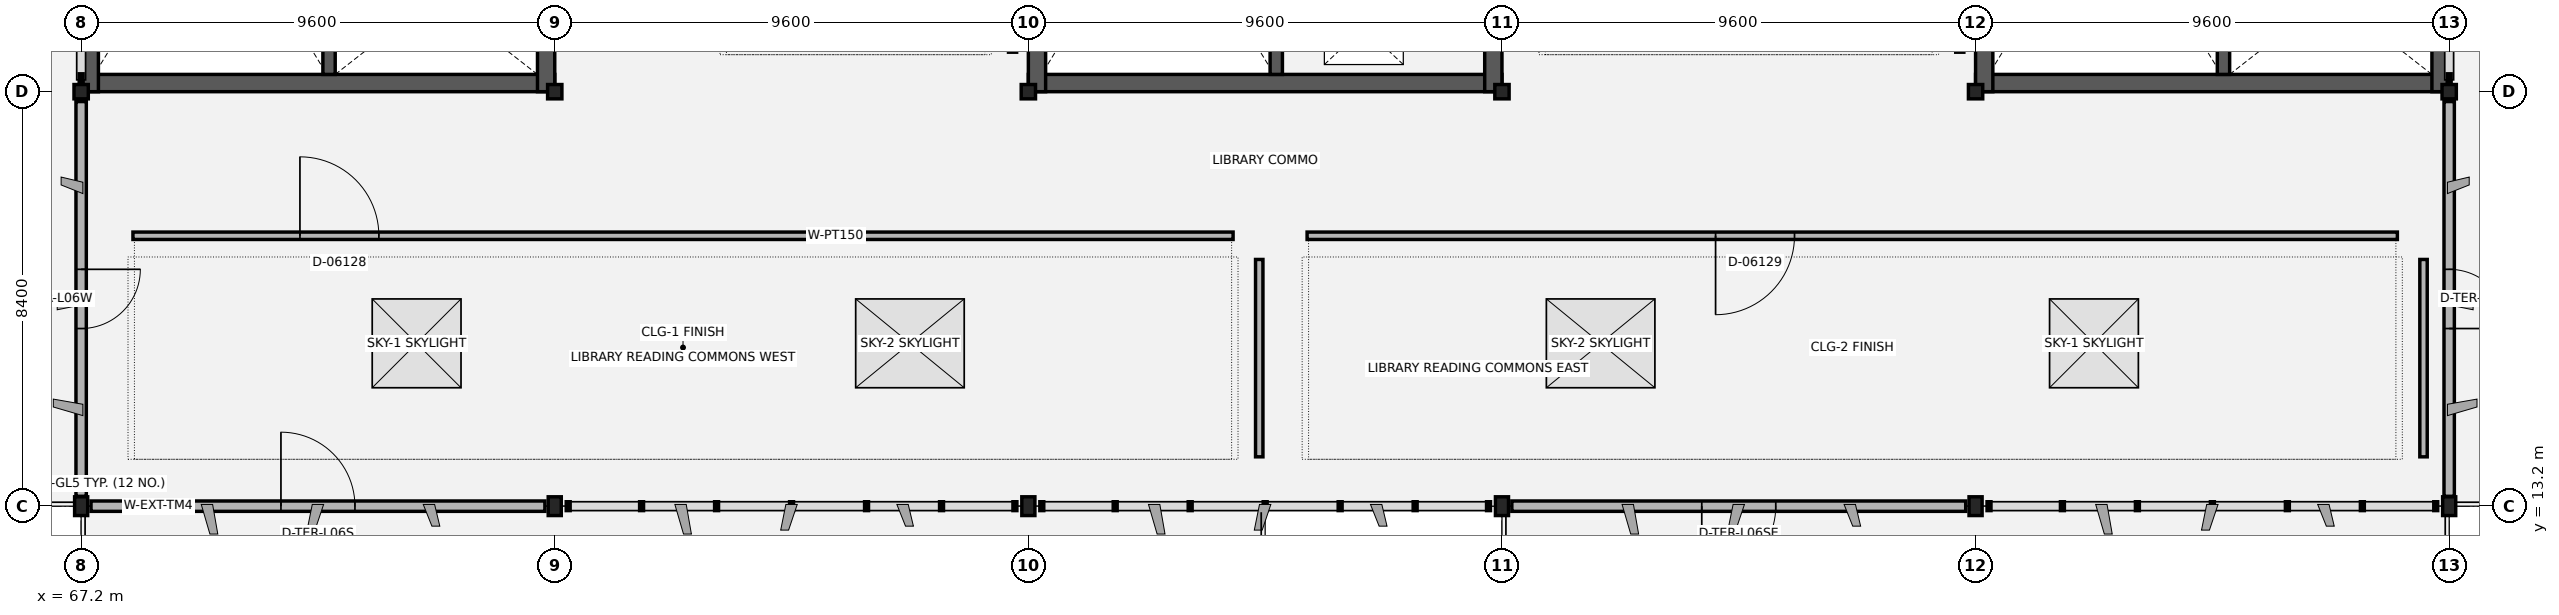
"""IFC4 building model, lengths in metres.
Left out: names, types, materials, properties, quantities, classifications, styles, units other than length and angle.
Written with IfcOpenShell. Run it as: python <this file> out.ifc"""

import sys

from ifc_helpers import new_model, si_unit, direction, frame, frame_2d, origin, origin_2d, place, context, subcontext, project, spatial, rectangle, extrude, element, fill, save


model = new_model("IFC4")
c1 = context("Model", 3, precision=1e-05, world=origin(), true_north=direction((0.0, 1.0)))
c2 = subcontext(c1, "Body", "Model", "MODEL_VIEW")
j1 = project(units=[si_unit("LENGTHUNIT", "METRE"), si_unit("PLANEANGLEUNIT", "RADIAN")], contexts=[c1])
p1 = place(None, origin())
s1 = spatial("IfcSite", under=j1, at=p1, CompositionType="ELEMENT")
p2 = place(p1, origin())
s2 = spatial("IfcBuilding", under=s1, at=p2, CompositionType="ELEMENT")
p3 = place(p2, frame((0.0, 0.0, 27.0)))
s3 = spatial("IfcBuildingStorey", under=s2, at=p3, CompositionType="ELEMENT", Elevation=27.0)
p4 = place(p3, frame((67.2, 13.2, 0.0), z_axis=(0.0, 0.0, 1.0), x_axis=(1.0, 0.0, 0.0)))
e1 = element("IfcColumn", 1, at=p4, inside=s3, PredefinedType="COLUMN", context=c2, shape_type="SweptSolid", body=[
    extrude(rectangle(XDim=0.265, YDim=0.38, at=origin_2d()), origin(), (0.0, 0.0, 1.0), 4.8),
])
p5 = place(p3, frame((67.2, 21.6, 0.0), z_axis=(0.0, 0.0, 1.0), x_axis=(1.0, 0.0, 0.0)))
e2 = element("IfcColumn", 2, at=p5, inside=s3, PredefinedType="COLUMN", context=c2, shape_type="SweptSolid", body=[
    extrude(rectangle(XDim=0.29, YDim=0.29, at=origin_2d()), origin(), (0.0, 0.0, 1.0), 4.8),
])
p6 = place(p3, frame((76.8, 13.2, 0.0), z_axis=(0.0, 0.0, 1.0), x_axis=(1.0, 0.0, 0.0)))
e3 = element("IfcColumn", 3, at=p6, inside=s3, PredefinedType="COLUMN", context=c2, shape_type="SweptSolid", body=[
    extrude(rectangle(XDim=0.265, YDim=0.38, at=origin_2d()), origin(), (0.0, 0.0, 1.0), 4.8),
])
p7 = place(p3, frame((76.8, 21.6, 0.0), z_axis=(0.0, 0.0, 1.0), x_axis=(1.0, 0.0, 0.0)))
e4 = element("IfcColumn", 4, at=p7, inside=s3, PredefinedType="COLUMN", context=c2, shape_type="SweptSolid", body=[
    extrude(rectangle(XDim=0.29, YDim=0.29, at=origin_2d()), origin(), (0.0, 0.0, 1.0), 4.8),
])
p8 = place(p3, frame((86.4, 13.2, 0.0), z_axis=(0.0, 0.0, 1.0), x_axis=(1.0, 0.0, 0.0)))
e5 = element("IfcColumn", 5, at=p8, inside=s3, PredefinedType="COLUMN", context=c2, shape_type="SweptSolid", body=[
    extrude(rectangle(XDim=0.265, YDim=0.38, at=origin_2d()), origin(), (0.0, 0.0, 1.0), 4.8),
])
p9 = place(p3, frame((86.4, 21.6, 0.0), z_axis=(0.0, 0.0, 1.0), x_axis=(1.0, 0.0, 0.0)))
e6 = element("IfcColumn", 6, at=p9, inside=s3, PredefinedType="COLUMN", context=c2, shape_type="SweptSolid", body=[
    extrude(rectangle(XDim=0.29, YDim=0.29, at=origin_2d()), origin(), (0.0, 0.0, 1.0), 4.8),
])
p10 = place(p3, frame((96.0, 13.2, 0.0), z_axis=(0.0, 0.0, 1.0), x_axis=(1.0, 0.0, 0.0)))
e7 = element("IfcColumn", 7, at=p10, inside=s3, PredefinedType="COLUMN", context=c2, shape_type="SweptSolid", body=[
    extrude(rectangle(XDim=0.265, YDim=0.38, at=origin_2d()), origin(), (0.0, 0.0, 1.0), 4.8),
])
p11 = place(p3, frame((96.0, 21.6, 0.0), z_axis=(0.0, 0.0, 1.0), x_axis=(1.0, 0.0, 0.0)))
e8 = element("IfcColumn", 8, at=p11, inside=s3, PredefinedType="COLUMN", context=c2, shape_type="SweptSolid", body=[
    extrude(rectangle(XDim=0.29, YDim=0.29, at=origin_2d()), origin(), (0.0, 0.0, 1.0), 4.8),
])
p12 = place(p3, frame((105.6, 13.2, 0.0), z_axis=(0.0, 0.0, 1.0), x_axis=(1.0, 0.0, 0.0)))
e9 = element("IfcColumn", 9, at=p12, inside=s3, PredefinedType="COLUMN", context=c2, shape_type="SweptSolid", body=[
    extrude(rectangle(XDim=0.265, YDim=0.38, at=origin_2d()), origin(), (0.0, 0.0, 1.0), 4.8),
])
p13 = place(p3, frame((105.6, 21.6, 0.0), z_axis=(0.0, 0.0, 1.0), x_axis=(1.0, 0.0, 0.0)))
e10 = element("IfcColumn", 10, at=p13, inside=s3, PredefinedType="COLUMN", context=c2, shape_type="SweptSolid", body=[
    extrude(rectangle(XDim=0.29, YDim=0.29, at=origin_2d()), origin(), (0.0, 0.0, 1.0), 4.8),
])
p14 = place(p3, frame((115.2, 13.2, 0.0), z_axis=(0.0, 0.0, 1.0), x_axis=(1.0, 0.0, 0.0)))
e11 = element("IfcColumn", 11, at=p14, inside=s3, PredefinedType="COLUMN", context=c2, shape_type="SweptSolid", body=[
    extrude(rectangle(XDim=0.265, YDim=0.38, at=origin_2d()), origin(), (0.0, 0.0, 1.0), 4.8),
])
p15 = place(p3, frame((115.2, 21.6, 0.0), z_axis=(0.0, 0.0, 1.0), x_axis=(1.0, 0.0, 0.0)))
e12 = element("IfcColumn", 12, at=p15, inside=s3, PredefinedType="COLUMN", context=c2, shape_type="SweptSolid", body=[
    extrude(rectangle(XDim=0.29, YDim=0.29, at=origin_2d()), origin(), (0.0, 0.0, 1.0), 4.8),
])
p16 = place(p3, frame((67.4, 13.2, 0.0), z_axis=(0.0, 0.0, 1.0), x_axis=(1.0, 0.0, 0.0)))
e13 = element("IfcWall", 13, at=p16, inside=s3, PredefinedType="SOLIDWALL", context=c2, shape_type="SweptSolid", body=[
    extrude(rectangle(XDim=9.2, YDim=0.21, at=frame_2d((4.6, 0.0))), origin(), (0.0, 0.0, 1.0), 3.965),
])
p17 = place(p16, frame((3.85, 0.0, 0.0)))
e14 = element("IfcOpeningElement", 14, at=p17, cuts=e13, PredefinedType="OPENING", context=c2, shape_type="SweptSolid", body=[
    extrude(rectangle(XDim=1.5, YDim=2.15, at=frame_2d((0.75, 1.075))), frame((0.0, 0.115, 0.0), z_axis=(0.0, -1.0, 0.0), x_axis=(1.0, 0.0, 0.0)), (0.0, 0.0, 1.0), 0.23),
])
p18 = place(p3, frame((96.2, 13.2, 0.0), z_axis=(0.0, 0.0, 1.0), x_axis=(1.0, 0.0, 0.0)))
e15 = element("IfcWall", 15, at=p18, inside=s3, PredefinedType="SOLIDWALL", context=c2, shape_type="SweptSolid", body=[
    extrude(rectangle(XDim=9.2, YDim=0.21, at=frame_2d((4.6, 0.0))), origin(), (0.0, 0.0, 1.0), 3.965),
])
p19 = place(p18, frame((3.85, 0.0, 0.0)))
e16 = element("IfcOpeningElement", 16, at=p19, cuts=e15, PredefinedType="OPENING", context=c2, shape_type="SweptSolid", body=[
    extrude(rectangle(XDim=1.5, YDim=2.15, at=frame_2d((0.75, 1.075))), frame((0.0, 0.115, 0.0), z_axis=(0.0, -1.0, 0.0), x_axis=(1.0, 0.0, 0.0)), (0.0, 0.0, 1.0), 0.23),
])
p20 = place(p3, frame((67.2, 21.4, 0.0), z_axis=(0.0, 0.0, 1.0), x_axis=(0.0, -1.0, 0.0)))
e17 = element("IfcWall", 17, at=p20, inside=s3, PredefinedType="SOLIDWALL", context=c2, shape_type="SweptSolid", body=[
    extrude(rectangle(XDim=8.0, YDim=0.21, at=frame_2d((4.0, 0.0))), origin(), (0.0, 0.0, 1.0), 3.965),
])
p21 = place(p20, frame((3.4, 0.0, 0.0)))
e18 = element("IfcOpeningElement", 18, at=p21, cuts=e17, PredefinedType="OPENING", context=c2, shape_type="SweptSolid", body=[
    extrude(rectangle(XDim=1.2, YDim=2.15, at=frame_2d((0.6, 1.075))), frame((0.0, 0.115, 0.0), z_axis=(0.0, -1.0, 0.0), x_axis=(1.0, 0.0, 0.0)), (0.0, 0.0, 1.0), 0.23),
])
p22 = place(p3, frame((115.2, 13.4, 0.0), z_axis=(0.0, 0.0, 1.0), x_axis=(0.0, 1.0, 0.0)))
e19 = element("IfcWall", 19, at=p22, inside=s3, PredefinedType="SOLIDWALL", context=c2, shape_type="SweptSolid", body=[
    extrude(rectangle(XDim=8.0, YDim=0.21, at=frame_2d((4.0, 0.0))), origin(), (0.0, 0.0, 1.0), 3.965),
])
p23 = place(p22, frame((3.4, 0.0, 0.0)))
e20 = element("IfcOpeningElement", 20, at=p23, cuts=e19, PredefinedType="OPENING", context=c2, shape_type="SweptSolid", body=[
    extrude(rectangle(XDim=1.2, YDim=2.15, at=frame_2d((0.6, 1.075))), frame((0.0, 0.115, 0.0), z_axis=(0.0, -1.0, 0.0), x_axis=(1.0, 0.0, 0.0)), (0.0, 0.0, 1.0), 0.23),
])
p24 = place(p3, frame((67.2, 21.775, 0.0), z_axis=(0.0, 0.0, 1.0), x_axis=(1.0, 0.0, 0.0)))
e21 = element("IfcWall", 21, at=p24, inside=s3, PredefinedType="SHEAR", context=c2, shape_type="SweptSolid", body=[
    extrude(rectangle(XDim=9.6, YDim=0.35, at=frame_2d((4.8, 0.0))), origin(), (0.0, 0.0, 1.0), 4.565),
])
p25 = place(p3, frame((67.375, 21.6, 0.0), z_axis=(0.0, 0.0, 1.0), x_axis=(0.0, 1.0, 0.0)))
e22 = element("IfcWall", 22, at=p25, inside=s3, PredefinedType="SHEAR", context=c2, shape_type="SweptSolid", body=[
    extrude(rectangle(XDim=8.4, YDim=0.35, at=frame_2d((4.2, 0.0))), origin(), (0.0, 0.0, 1.0), 4.565),
])
p26 = place(p3, frame((76.625, 21.6, 0.0), z_axis=(0.0, 0.0, 1.0), x_axis=(0.0, 1.0, 0.0)))
e23 = element("IfcWall", 23, at=p26, inside=s3, PredefinedType="SHEAR", context=c2, shape_type="SweptSolid", body=[
    extrude(rectangle(XDim=8.4, YDim=0.35, at=frame_2d((4.2, 0.0))), origin(), (0.0, 0.0, 1.0), 4.565),
])
p27 = place(p26, frame((5.3, 0.0, 0.0)))
e24 = element("IfcOpeningElement", 24, at=p27, cuts=e23, PredefinedType="OPENING", context=c2, shape_type="SweptSolid", body=[
    extrude(rectangle(XDim=1.4, YDim=2.15, at=frame_2d((0.7, 1.075))), frame((0.0, 0.185, 0.0), z_axis=(0.0, -1.0, 0.0), x_axis=(1.0, 0.0, 0.0)), (0.0, 0.0, 1.0), 0.37),
])
p28 = place(p3, frame((72.225, 29.65, 0.0), z_axis=(0.0, 0.0, 1.0), x_axis=(0.0, -1.0, 0.0)))
e25 = element("IfcWall", 25, at=p28, inside=s3, PredefinedType="SHEAR", context=c2, shape_type="SweptSolid", body=[
    extrude(rectangle(XDim=7.7, YDim=0.25, at=frame_2d((3.85, 0.0))), origin(), (0.0, 0.0, 1.0), 4.565),
])
p29 = place(p28, frame((0.45, 0.0, 0.0)))
e26 = element("IfcOpeningElement", 26, at=p29, cuts=e25, PredefinedType="OPENING", context=c2, shape_type="SweptSolid", body=[
    extrude(rectangle(XDim=1.25, YDim=2.15, at=frame_2d((0.625, 1.075))), frame((0.0, 0.135, 0.0), z_axis=(0.0, -1.0, 0.0), x_axis=(1.0, 0.0, 0.0)), (0.0, 0.0, 1.0), 0.27),
])
p30 = place(p3, frame((105.6, 21.775, 0.0), z_axis=(0.0, 0.0, 1.0), x_axis=(1.0, 0.0, 0.0)))
e27 = element("IfcWall", 27, at=p30, inside=s3, PredefinedType="SHEAR", context=c2, shape_type="SweptSolid", body=[
    extrude(rectangle(XDim=9.6, YDim=0.35, at=frame_2d((4.8, 0.0))), origin(), (0.0, 0.0, 1.0), 4.565),
])
p31 = place(p3, frame((105.775, 21.6, 0.0), z_axis=(0.0, 0.0, 1.0), x_axis=(0.0, 1.0, 0.0)))
e28 = element("IfcWall", 28, at=p31, inside=s3, PredefinedType="SHEAR", context=c2, shape_type="SweptSolid", body=[
    extrude(rectangle(XDim=8.4, YDim=0.35, at=frame_2d((4.2, 0.0))), origin(), (0.0, 0.0, 1.0), 4.565),
])
p32 = place(p3, frame((115.025, 21.6, 0.0), z_axis=(0.0, 0.0, 1.0), x_axis=(0.0, 1.0, 0.0)))
e29 = element("IfcWall", 29, at=p32, inside=s3, PredefinedType="SHEAR", context=c2, shape_type="SweptSolid", body=[
    extrude(rectangle(XDim=8.4, YDim=0.35, at=frame_2d((4.2, 0.0))), origin(), (0.0, 0.0, 1.0), 4.565),
])
p33 = place(p32, frame((5.3, 0.0, 0.0)))
e30 = element("IfcOpeningElement", 30, at=p33, cuts=e29, PredefinedType="OPENING", context=c2, shape_type="SweptSolid", body=[
    extrude(rectangle(XDim=1.4, YDim=2.15, at=frame_2d((0.7, 1.075))), frame((0.0, 0.185, 0.0), z_axis=(0.0, -1.0, 0.0), x_axis=(1.0, 0.0, 0.0)), (0.0, 0.0, 1.0), 0.37),
])
p34 = place(p3, frame((110.625, 29.65, 0.0), z_axis=(0.0, 0.0, 1.0), x_axis=(0.0, -1.0, 0.0)))
e31 = element("IfcWall", 31, at=p34, inside=s3, PredefinedType="SHEAR", context=c2, shape_type="SweptSolid", body=[
    extrude(rectangle(XDim=7.7, YDim=0.25, at=frame_2d((3.85, 0.0))), origin(), (0.0, 0.0, 1.0), 4.565),
])
p35 = place(p34, frame((0.45, 0.0, 0.0)))
e32 = element("IfcOpeningElement", 32, at=p35, cuts=e31, PredefinedType="OPENING", context=c2, shape_type="SweptSolid", body=[
    extrude(rectangle(XDim=1.25, YDim=2.15, at=frame_2d((0.625, 1.075))), frame((0.0, 0.135, 0.0), z_axis=(0.0, -1.0, 0.0), x_axis=(1.0, 0.0, 0.0)), (0.0, 0.0, 1.0), 0.27),
])
p36 = place(p3, frame((86.4, 21.775, 0.0), z_axis=(0.0, 0.0, 1.0), x_axis=(1.0, 0.0, 0.0)))
e33 = element("IfcWall", 33, at=p36, inside=s3, PredefinedType="SHEAR", context=c2, shape_type="SweptSolid", body=[
    extrude(rectangle(XDim=9.6, YDim=0.35, at=frame_2d((4.8, 0.0))), origin(), (0.0, 0.0, 1.0), 4.565),
])
p37 = place(p3, frame((86.575, 21.6, 0.0), z_axis=(0.0, 0.0, 1.0), x_axis=(0.0, 1.0, 0.0)))
e34 = element("IfcWall", 34, at=p37, inside=s3, PredefinedType="SHEAR", context=c2, shape_type="SweptSolid", body=[
    extrude(rectangle(XDim=8.4, YDim=0.35, at=frame_2d((4.2, 0.0))), origin(), (0.0, 0.0, 1.0), 4.565),
])
p38 = place(p3, frame((95.825, 21.6, 0.0), z_axis=(0.0, 0.0, 1.0), x_axis=(0.0, 1.0, 0.0)))
e35 = element("IfcWall", 35, at=p38, inside=s3, PredefinedType="SHEAR", context=c2, shape_type="SweptSolid", body=[
    extrude(rectangle(XDim=8.4, YDim=0.35, at=frame_2d((4.2, 0.0))), origin(), (0.0, 0.0, 1.0), 4.565),
])
p39 = place(p38, frame((5.3, 0.0, 0.0)))
e36 = element("IfcOpeningElement", 36, at=p39, cuts=e35, PredefinedType="OPENING", context=c2, shape_type="SweptSolid", body=[
    extrude(rectangle(XDim=1.4, YDim=2.15, at=frame_2d((0.7, 1.075))), frame((0.0, 0.185, 0.0), z_axis=(0.0, -1.0, 0.0), x_axis=(1.0, 0.0, 0.0)), (0.0, 0.0, 1.0), 0.37),
])
p40 = place(p3, frame((91.425, 29.65, 0.0), z_axis=(0.0, 0.0, 1.0), x_axis=(0.0, -1.0, 0.0)))
e37 = element("IfcWall", 37, at=p40, inside=s3, PredefinedType="SHEAR", context=c2, shape_type="SweptSolid", body=[
    extrude(rectangle(XDim=7.7, YDim=0.25, at=frame_2d((3.85, 0.0))), origin(), (0.0, 0.0, 1.0), 4.565),
])
p41 = place(p40, frame((0.45, 0.0, 0.0)))
e38 = element("IfcOpeningElement", 38, at=p41, cuts=e37, PredefinedType="OPENING", context=c2, shape_type="SweptSolid", body=[
    extrude(rectangle(XDim=1.25, YDim=2.15, at=frame_2d((0.625, 1.075))), frame((0.0, 0.135, 0.0), z_axis=(0.0, -1.0, 0.0), x_axis=(1.0, 0.0, 0.0)), (0.0, 0.0, 1.0), 0.27),
])
p42 = place(p3, frame((68.25, 18.68, 0.0), z_axis=(0.0, 0.0, 1.0), x_axis=(1.0, 0.0, 0.0)))
e39 = element("IfcWall", 39, at=p42, inside=s3, PredefinedType="PARTITIONING", context=c2, shape_type="SweptSolid", body=[
    extrude(rectangle(XDim=22.3, YDim=0.15, at=frame_2d((11.15, 0.0))), origin(), (0.0, 0.0, 1.0), 3.945),
])
p43 = place(p42, frame((3.385, 0.0, 0.0)))
e40 = element("IfcOpeningElement", 40, at=p43, cuts=e39, PredefinedType="OPENING", context=c2, shape_type="SweptSolid", body=[
    extrude(rectangle(XDim=1.6, YDim=2.15, at=frame_2d((0.8, 1.075))), frame((0.0, 0.085, 0.0), z_axis=(0.0, -1.0, 0.0), x_axis=(1.0, 0.0, 0.0)), (0.0, 0.0, 1.0), 0.17),
])
p44 = place(p3, frame((91.08, 14.2, 0.0), z_axis=(0.0, 0.0, 1.0), x_axis=(0.0, 1.0, 0.0)))
e41 = element("IfcWall", 41, at=p44, inside=s3, PredefinedType="PARTITIONING", context=c2, shape_type="SweptSolid", body=[
    extrude(rectangle(XDim=4.0, YDim=0.15, at=frame_2d((2.0, 0.0))), origin(), (0.0, 0.0, 1.0), 3.945),
])
p45 = place(p3, frame((92.05, 18.68, 0.0), z_axis=(0.0, 0.0, 1.0), x_axis=(1.0, 0.0, 0.0)))
e42 = element("IfcWall", 42, at=p45, inside=s3, PredefinedType="PARTITIONING", context=c2, shape_type="SweptSolid", body=[
    extrude(rectangle(XDim=22.1, YDim=0.15, at=frame_2d((11.05, 0.0))), origin(), (0.0, 0.0, 1.0), 3.945),
])
p46 = place(p45, frame((8.28, 0.0, 0.0)))
e43 = element("IfcOpeningElement", 43, at=p46, cuts=e42, PredefinedType="OPENING", context=c2, shape_type="SweptSolid", body=[
    extrude(rectangle(XDim=1.6, YDim=2.15, at=frame_2d((0.8, 1.075))), frame((0.0, 0.085, 0.0), z_axis=(0.0, -1.0, 0.0), x_axis=(1.0, 0.0, 0.0)), (0.0, 0.0, 1.0), 0.17),
])
p47 = place(p3, frame((114.68, 14.2, 0.0), z_axis=(0.0, 0.0, 1.0), x_axis=(0.0, 1.0, 0.0)))
e44 = element("IfcWall", 44, at=p47, inside=s3, PredefinedType="PARTITIONING", context=c2, shape_type="SweptSolid", body=[
    extrude(rectangle(XDim=4.0, YDim=0.15, at=frame_2d((2.0, 0.0))), origin(), (0.0, 0.0, 1.0), 3.945),
])
p48 = place(p17, origin())
e45 = element("IfcDoor", 45, at=p48, inside=s3, OperationType="SINGLE_SWING_LEFT", PredefinedType="DOOR", context=c2, shape_type="SweptSolid", body=[
    extrude(rectangle(XDim=1.5, YDim=2.15, at=frame_2d((0.75, 1.075))), frame((0.0, 0.025, 0.0), z_axis=(0.0, -1.0, 0.0), x_axis=(1.0, 0.0, 0.0)), (0.0, 0.0, 1.0), 0.05),
])
fill(e14, e45)
p49 = place(p19, origin())
e46 = element("IfcDoor", 46, at=p49, inside=s3, OperationType="SINGLE_SWING_RIGHT", PredefinedType="DOOR", context=c2, shape_type="SweptSolid", body=[
    extrude(rectangle(XDim=1.5, YDim=2.15, at=frame_2d((0.75, 1.075))), frame((0.0, 0.025, 0.0), z_axis=(0.0, -1.0, 0.0), x_axis=(1.0, 0.0, 0.0)), (0.0, 0.0, 1.0), 0.05),
])
fill(e16, e46)
p50 = place(p21, origin())
e47 = element("IfcDoor", 47, at=p50, inside=s3, OperationType="SINGLE_SWING_LEFT", PredefinedType="DOOR", context=c2, shape_type="SweptSolid", body=[
    extrude(rectangle(XDim=1.2, YDim=2.15, at=frame_2d((0.6, 1.075))), frame((0.0, 0.025, 0.0), z_axis=(0.0, -1.0, 0.0), x_axis=(1.0, 0.0, 0.0)), (0.0, 0.0, 1.0), 0.05),
])
fill(e18, e47)
p51 = place(p23, origin())
e48 = element("IfcDoor", 48, at=p51, inside=s3, OperationType="SINGLE_SWING_RIGHT", PredefinedType="DOOR", context=c2, shape_type="SweptSolid", body=[
    extrude(rectangle(XDim=1.2, YDim=2.15, at=frame_2d((0.6, 1.075))), frame((0.0, 0.025, 0.0), z_axis=(0.0, -1.0, 0.0), x_axis=(1.0, 0.0, 0.0)), (0.0, 0.0, 1.0), 0.05),
])
fill(e20, e48)
p52 = place(p2, frame((0.0, 0.0, 31.8)))
p53 = place(p52, frame((0.0, 0.0, -0.235)))
p54 = place(p53, frame((74.0, 16.5, 0.0)))
p55 = place(p54, frame((0.0, 0.0, 0.185)))
e49 = element("IfcWindow", 49, at=p55, inside=s3, PartitioningType="SINGLE_PANEL", PredefinedType="SKYLIGHT", context=c2, shape_type="SweptSolid", body=[
    extrude(rectangle(XDim=1.8, YDim=1.8, at=origin_2d()), origin(), (0.0, 0.0, 1.0), 0.05),
])
p56 = place(p53, frame((84.0, 16.5, 0.0)))
p57 = place(p56, frame((0.0, 0.0, 0.185)))
e50 = element("IfcWindow", 50, at=p57, inside=s3, PartitioningType="SINGLE_PANEL", PredefinedType="SKYLIGHT", context=c2, shape_type="SweptSolid", body=[
    extrude(rectangle(XDim=2.2, YDim=1.8, at=origin_2d()), origin(), (0.0, 0.0, 1.0), 0.05),
])
p58 = place(p53, frame((98.0, 16.5, 0.0)))
p59 = place(p58, frame((0.0, 0.0, 0.185)))
e51 = element("IfcWindow", 51, at=p59, inside=s3, PartitioningType="SINGLE_PANEL", PredefinedType="SKYLIGHT", context=c2, shape_type="SweptSolid", body=[
    extrude(rectangle(XDim=2.2, YDim=1.8, at=origin_2d()), origin(), (0.0, 0.0, 1.0), 0.05),
])
p60 = place(p53, frame((108.0, 16.5, 0.0)))
p61 = place(p60, frame((0.0, 0.0, 0.185)))
e52 = element("IfcWindow", 52, at=p61, inside=s3, PartitioningType="SINGLE_PANEL", PredefinedType="SKYLIGHT", context=c2, shape_type="SweptSolid", body=[
    extrude(rectangle(XDim=1.8, YDim=1.8, at=origin_2d()), origin(), (0.0, 0.0, 1.0), 0.05),
])
p62 = place(p43, origin())
e53 = element("IfcDoor", 53, at=p62, inside=s3, OperationType="SINGLE_SWING_LEFT", PredefinedType="DOOR", context=c2, shape_type="SweptSolid", body=[
    extrude(rectangle(XDim=1.6, YDim=2.15, at=frame_2d((0.8, 1.075))), frame((0.0, 0.025, 0.0), z_axis=(0.0, -1.0, 0.0), x_axis=(1.0, 0.0, 0.0)), (0.0, 0.0, 1.0), 0.05),
])
fill(e40, e53)
p63 = place(p46, origin())
e54 = element("IfcDoor", 54, at=p63, inside=s3, OperationType="SINGLE_SWING_RIGHT", PredefinedType="DOOR", context=c2, shape_type="SweptSolid", body=[
    extrude(rectangle(XDim=1.6, YDim=2.15, at=frame_2d((0.8, 1.075))), frame((0.0, 0.025, 0.0), z_axis=(0.0, -1.0, 0.0), x_axis=(1.0, 0.0, 0.0)), (0.0, 0.0, 1.0), 0.05),
])
fill(e43, e54)
save(model, sys.argv[1])
